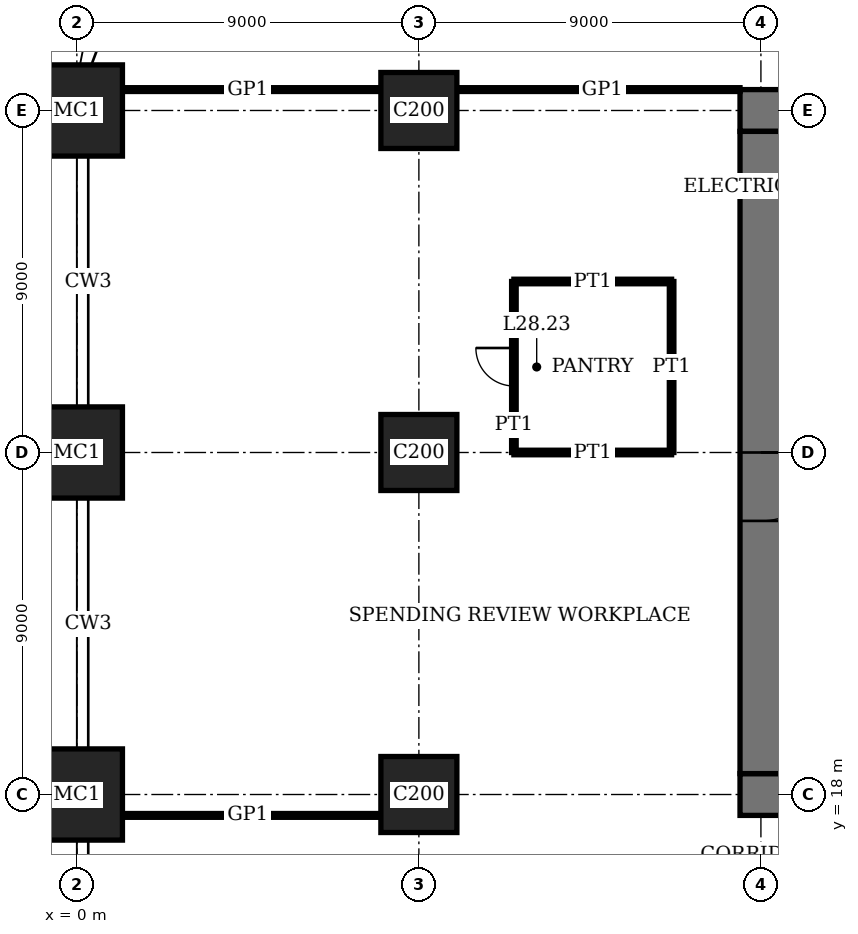
"""IFC4 building model, lengths in metres.
Left out: names, types, materials, properties, quantities, classifications, styles, units other than length and angle.
Written with IfcOpenShell. Run it as: python <this file> out.ifc"""

import sys

from ifc_helpers import new_model, si_unit, direction, frame, frame_2d, origin, origin_2d, place, context, subcontext, project, spatial, rectangle, extrude, element, fill, save


model = new_model("IFC4")
c1 = context("Model", 3, precision=1e-05, world=origin(), true_north=direction((0.0, 1.0)))
c2 = subcontext(c1, "Body", "Model", "MODEL_VIEW")
j1 = project(units=[si_unit("LENGTHUNIT", "METRE"), si_unit("PLANEANGLEUNIT", "RADIAN")], contexts=[c1])
p1 = place(None, origin())
s1 = spatial("IfcSite", under=j1, at=p1, CompositionType="ELEMENT")
p2 = place(p1, origin())
s2 = spatial("IfcBuilding", under=s1, at=p2, CompositionType="ELEMENT")
p3 = place(p2, frame((0.0, 0.0, 117.0)))
s3 = spatial("IfcBuildingStorey", under=s2, at=p3, CompositionType="ELEMENT", Elevation=117.0)
for number, where, z_axis, x_axis in (
    (1, (0.0, 18.0, 0.0), (0.0, 0.0, 1.0), (1.0, 0.0, 0.0)),
    (2, (0.0, 27.0, 0.0), (0.0, 0.0, 1.0), (1.0, 0.0, 0.0)),
    (3, (0.0, 36.0, 0.0), (0.0, 0.0, 1.0), (1.0, 0.0, 0.0)),
):
    element("IfcColumn", number, at=place(p3, frame(where, z_axis=z_axis, x_axis=x_axis)), inside=s3, PredefinedType="COLUMN", context=c2, shape_type="SweptSolid", body=[
        extrude(rectangle(XDim=2.4, YDim=2.4, at=origin_2d()), origin(), (0.0, 0.0, 1.0), 4.0),
    ])
for number, where, z_axis, x_axis in (
    (4, (9.0, 18.0, 0.0), (0.0, 0.0, 1.0), (1.0, 0.0, 0.0)),
    (5, (9.0, 27.0, 0.0), (0.0, 0.0, 1.0), (1.0, 0.0, 0.0)),
    (6, (9.0, 36.0, 0.0), (0.0, 0.0, 1.0), (1.0, 0.0, 0.0)),
):
    element("IfcColumn", number, at=place(p3, frame(where, z_axis=z_axis, x_axis=x_axis)), inside=s3, PredefinedType="COLUMN", context=c2, shape_type="SweptSolid", body=[
        extrude(rectangle(XDim=2.0, YDim=2.0, at=origin_2d()), origin(), (0.0, 0.0, 1.0), 4.0),
    ])
p4 = place(p3, frame((17.45, 18.0, 0.0), z_axis=(0.0, 0.0, 1.0), x_axis=(1.0, 0.0, 0.0)))
e7 = element("IfcWall", 7, at=p4, inside=s3, PredefinedType="SHEAR", context=c2, shape_type="SweptSolid", body=[
    extrude(rectangle(XDim=28.1, YDim=1.1, at=frame_2d((14.05, 0.0))), origin(), (0.0, 0.0, 1.0), 4.0),
])
p5 = place(p4, frame((11.55, 0.0, 0.0)))
e8 = element("IfcOpeningElement", 8, at=p5, cuts=e7, PredefinedType="OPENING", context=c2, shape_type="SweptSolid", body=[
    extrude(rectangle(XDim=1.0, YDim=2.4, at=frame_2d((0.5, 1.2))), frame((0.0, 0.56, 0.0), z_axis=(0.0, -1.0, 0.0), x_axis=(1.0, 0.0, 0.0)), (0.0, 0.0, 1.0), 1.12),
])
p6 = place(p4, frame((16.55, 0.0, 0.0)))
e9 = element("IfcOpeningElement", 9, at=p6, cuts=e7, PredefinedType="OPENING", context=c2, shape_type="SweptSolid", body=[
    extrude(rectangle(XDim=1.0, YDim=2.4, at=frame_2d((0.5, 1.2))), frame((0.0, 0.56, 0.0), z_axis=(0.0, -1.0, 0.0), x_axis=(1.0, 0.0, 0.0)), (0.0, 0.0, 1.0), 1.12),
])
p7 = place(p4, frame((20.0, 0.0, 0.0)))
e10 = element("IfcOpeningElement", 10, at=p7, cuts=e7, PredefinedType="OPENING", context=c2, shape_type="SweptSolid", body=[
    extrude(rectangle(XDim=1.1, YDim=2.4, at=frame_2d((0.55, 1.2))), frame((0.0, 0.56, 0.0), z_axis=(0.0, -1.0, 0.0), x_axis=(1.0, 0.0, 0.0)), (0.0, 0.0, 1.0), 1.12),
])
p8 = place(p4, frame((24.05, 0.0, 0.0)))
e11 = element("IfcOpeningElement", 11, at=p8, cuts=e7, PredefinedType="OPENING", context=c2, shape_type="SweptSolid", body=[
    extrude(rectangle(XDim=1.0, YDim=2.4, at=frame_2d((0.5, 1.2))), frame((0.0, 0.56, 0.0), z_axis=(0.0, -1.0, 0.0), x_axis=(1.0, 0.0, 0.0)), (0.0, 0.0, 1.0), 1.12),
])
p9 = place(p3, frame((45.55, 36.0, 0.0), z_axis=(0.0, 0.0, 1.0), x_axis=(-1.0, 0.0, 0.0)))
e12 = element("IfcWall", 12, at=p9, inside=s3, PredefinedType="SHEAR", context=c2, shape_type="SweptSolid", body=[
    extrude(rectangle(XDim=28.1, YDim=1.1, at=frame_2d((14.05, 0.0))), origin(), (0.0, 0.0, 1.0), 4.0),
])
p10 = place(p9, frame((11.55, 0.0, 0.0)))
e13 = element("IfcOpeningElement", 13, at=p10, cuts=e12, PredefinedType="OPENING", context=c2, shape_type="SweptSolid", body=[
    extrude(rectangle(XDim=1.0, YDim=2.4, at=frame_2d((0.5, 1.2))), frame((0.0, 0.56, 0.0), z_axis=(0.0, -1.0, 0.0), x_axis=(1.0, 0.0, 0.0)), (0.0, 0.0, 1.0), 1.12),
])
p11 = place(p9, frame((16.55, 0.0, 0.0)))
e14 = element("IfcOpeningElement", 14, at=p11, cuts=e12, PredefinedType="OPENING", context=c2, shape_type="SweptSolid", body=[
    extrude(rectangle(XDim=1.0, YDim=2.4, at=frame_2d((0.5, 1.2))), frame((0.0, 0.56, 0.0), z_axis=(0.0, -1.0, 0.0), x_axis=(1.0, 0.0, 0.0)), (0.0, 0.0, 1.0), 1.12),
])
p12 = place(p9, frame((20.0, 0.0, 0.0)))
e15 = element("IfcOpeningElement", 15, at=p12, cuts=e12, PredefinedType="OPENING", context=c2, shape_type="SweptSolid", body=[
    extrude(rectangle(XDim=1.1, YDim=2.4, at=frame_2d((0.55, 1.2))), frame((0.0, 0.56, 0.0), z_axis=(0.0, -1.0, 0.0), x_axis=(1.0, 0.0, 0.0)), (0.0, 0.0, 1.0), 1.12),
])
p13 = place(p9, frame((24.05, 0.0, 0.0)))
e16 = element("IfcOpeningElement", 16, at=p13, cuts=e12, PredefinedType="OPENING", context=c2, shape_type="SweptSolid", body=[
    extrude(rectangle(XDim=1.0, YDim=2.4, at=frame_2d((0.5, 1.2))), frame((0.0, 0.56, 0.0), z_axis=(0.0, -1.0, 0.0), x_axis=(1.0, 0.0, 0.0)), (0.0, 0.0, 1.0), 1.12),
])
p14 = place(p3, frame((18.0, 35.45, 0.0), z_axis=(0.0, 0.0, 1.0), x_axis=(0.0, -1.0, 0.0)))
e17 = element("IfcWall", 17, at=p14, inside=s3, PredefinedType="SHEAR", context=c2, shape_type="SweptSolid", body=[
    extrude(rectangle(XDim=16.9, YDim=1.1, at=frame_2d((8.45, 0.0))), origin(), (0.0, 0.0, 1.0), 4.0),
])
p15 = place(p14, frame((8.45, 0.0, 0.0)))
e18 = element("IfcOpeningElement", 18, at=p15, cuts=e17, PredefinedType="OPENING", context=c2, shape_type="SweptSolid", body=[
    extrude(rectangle(XDim=1.8, YDim=2.4, at=frame_2d((0.9, 1.2))), frame((0.0, 0.56, 0.0), z_axis=(0.0, -1.0, 0.0), x_axis=(1.0, 0.0, 0.0)), (0.0, 0.0, 1.0), 1.12),
])
p16 = place(p3, frame((1.2, 17.45, 0.0), z_axis=(0.0, 0.0, 1.0), x_axis=(1.0, 0.0, 0.0)))
e19 = element("IfcWall", 19, at=p16, inside=s3, PredefinedType="PARTITIONING", context=c2, shape_type="SweptSolid", body=[
    extrude(rectangle(XDim=6.8, YDim=0.1, at=frame_2d((3.4, 0.0))), origin(), (0.0, 0.0, 1.0), 3.75),
])
p17 = place(p3, frame((11.5, 27.0, 0.0), z_axis=(0.0, 0.0, 1.0), x_axis=(1.0, 0.0, 0.0)))
e20 = element("IfcWall", 20, at=p17, inside=s3, PredefinedType="PARTITIONING", context=c2, shape_type="SweptSolid", body=[
    extrude(rectangle(XDim=4.15, YDim=0.12, at=frame_2d((2.075, 0.0))), origin(), (0.0, 0.0, 1.0), 3.05),
])
p18 = place(p3, frame((11.5, 31.5, 0.0), z_axis=(0.0, 0.0, 1.0), x_axis=(1.0, 0.0, 0.0)))
e21 = element("IfcWall", 21, at=p18, inside=s3, PredefinedType="PARTITIONING", context=c2, shape_type="SweptSolid", body=[
    extrude(rectangle(XDim=4.15, YDim=0.12, at=frame_2d((2.075, 0.0))), origin(), (0.0, 0.0, 1.0), 3.1),
])
p19 = place(p3, frame((1.2, 36.55, 0.0), z_axis=(0.0, 0.0, 1.0), x_axis=(1.0, 0.0, 0.0)))
e22 = element("IfcWall", 22, at=p19, inside=s3, PredefinedType="PARTITIONING", context=c2, shape_type="SweptSolid", body=[
    extrude(rectangle(XDim=6.8, YDim=0.1, at=frame_2d((3.4, 0.0))), origin(), (0.0, 0.0, 1.0), 3.75),
])
p20 = place(p3, frame((10.0, 36.55, 0.0), z_axis=(0.0, 0.0, 1.0), x_axis=(1.0, 0.0, 0.0)))
e23 = element("IfcWall", 23, at=p20, inside=s3, PredefinedType="PARTITIONING", context=c2, shape_type="SweptSolid", body=[
    extrude(rectangle(XDim=7.45, YDim=0.1, at=frame_2d((3.725, 0.0))), origin(), (0.0, 0.0, 1.0), 3.75),
])
p21 = place(p3, frame((11.5, 27.0, 0.0), z_axis=(0.0, 0.0, 1.0), x_axis=(0.0, 1.0, 0.0)))
e24 = element("IfcWall", 24, at=p21, inside=s3, PredefinedType="PARTITIONING", context=c2, shape_type="SweptSolid", body=[
    extrude(rectangle(XDim=4.5, YDim=0.12, at=frame_2d((2.25, 0.0))), origin(), (0.0, 0.0, 1.0), 3.75),
])
p22 = place(p21, frame((1.75, 0.0, 0.0)))
e25 = element("IfcOpeningElement", 25, at=p22, cuts=e24, PredefinedType="OPENING", context=c2, shape_type="SweptSolid", body=[
    extrude(rectangle(XDim=1.0, YDim=2.4, at=frame_2d((0.5, 1.2))), frame((0.0, 0.07, 0.0), z_axis=(0.0, -1.0, 0.0), x_axis=(1.0, 0.0, 0.0)), (0.0, 0.0, 1.0), 0.14),
])
p23 = place(p3, frame((15.65, 27.0, 0.0), z_axis=(0.0, 0.0, 1.0), x_axis=(0.0, 1.0, 0.0)))
e26 = element("IfcWall", 26, at=p23, inside=s3, PredefinedType="PARTITIONING", context=c2, shape_type="SweptSolid", body=[
    extrude(rectangle(XDim=4.5, YDim=0.12, at=frame_2d((2.25, 0.0))), origin(), (0.0, 0.0, 1.0), 3.75),
])
p24 = place(p15, origin())
e27 = element("IfcDoor", 27, at=p24, inside=s3, OperationType="DOUBLE_DOOR_DOUBLE_SWING", PredefinedType="DOOR", context=c2, shape_type="SweptSolid", body=[
    extrude(rectangle(XDim=1.8, YDim=2.4, at=frame_2d((0.9, 1.2))), frame((0.0, 0.03, 0.0), z_axis=(0.0, -1.0, 0.0), x_axis=(1.0, 0.0, 0.0)), (0.0, 0.0, 1.0), 0.06),
    extrude(rectangle(XDim=0.04, YDim=2.4, at=frame_2d((0.02, 1.2))), frame((0.0, 0.55, 0.0), z_axis=(0.0, -1.0, 0.0), x_axis=(1.0, 0.0, 0.0)), (0.0, 0.0, 1.0), 1.1),
    extrude(rectangle(XDim=0.04, YDim=2.4, at=frame_2d((1.78, 1.2))), frame((0.0, 0.55, 0.0), z_axis=(0.0, -1.0, 0.0), x_axis=(1.0, 0.0, 0.0)), (0.0, 0.0, 1.0), 1.1),
    extrude(rectangle(XDim=1.8, YDim=0.04, at=frame_2d((0.9, 2.38))), frame((0.0, 0.55, 0.0), z_axis=(0.0, -1.0, 0.0), x_axis=(1.0, 0.0, 0.0)), (0.0, 0.0, 1.0), 1.1),
])
fill(e18, e27)
p25 = place(p22, origin())
e28 = element("IfcDoor", 28, at=p25, inside=s3, OperationType="SINGLE_SWING_LEFT", PredefinedType="DOOR", context=c2, shape_type="SweptSolid", body=[
    extrude(rectangle(XDim=1.0, YDim=2.4, at=frame_2d((0.5, 1.2))), frame((0.0, 0.025, 0.0), z_axis=(0.0, -1.0, 0.0), x_axis=(1.0, 0.0, 0.0)), (0.0, 0.0, 1.0), 0.05),
])
fill(e25, e28)
save(model, sys.argv[1])
